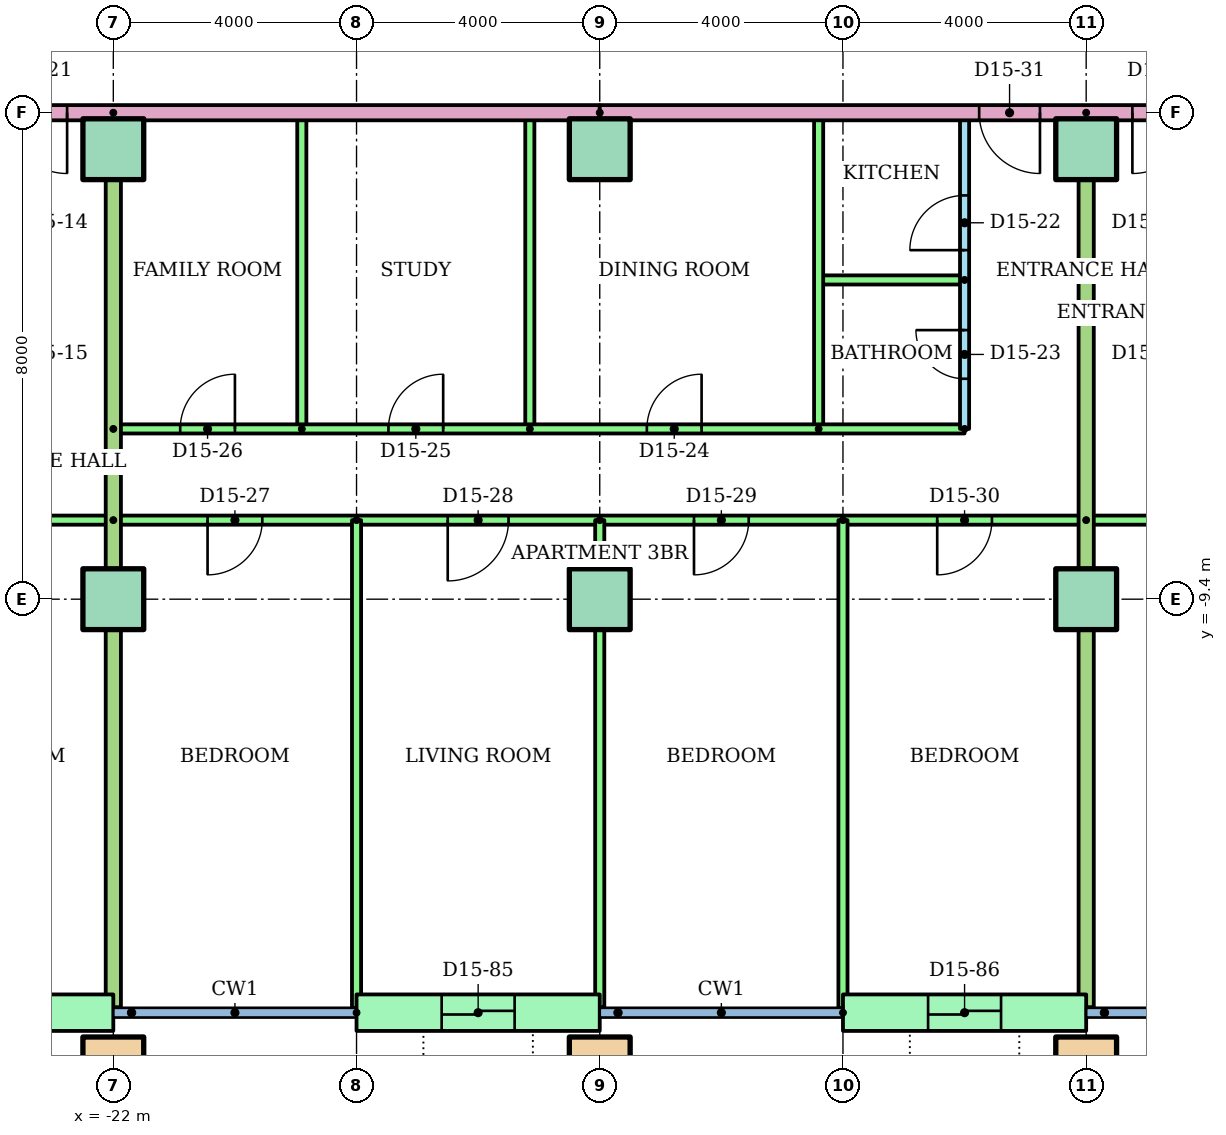
"""IFC4 building model, lengths in metres.
Left out: names, types, materials, properties, quantities, classifications, styles, units other than length and angle.
Written with IfcOpenShell. Run it as: python <this file> out.ifc"""

import sys

from ifc_helpers import new_model, si_unit, direction, frame, frame_2d, origin, origin_2d, place, context, subcontext, project, spatial, rectangle, hollow_rectangle, extrude, element, fill, save


model = new_model("IFC4")
c1 = context("Model", 3, precision=1e-05, world=origin(), true_north=direction((0.0, 1.0)))
c2 = subcontext(c1, "Body", "Model", "MODEL_VIEW")
j1 = project(units=[si_unit("LENGTHUNIT", "METRE"), si_unit("PLANEANGLEUNIT", "RADIAN")], contexts=[c1])
p1 = place(None, origin())
s1 = spatial("IfcSite", under=j1, at=p1, CompositionType="ELEMENT")
p2 = place(p1, origin())
s2 = spatial("IfcBuilding", under=s1, at=p2, CompositionType="ELEMENT")
p3 = place(p2, frame((0.0, 0.0, 57.6)))
s3 = spatial("IfcBuildingStorey", under=s2, at=p3, CompositionType="ELEMENT", Elevation=57.6)
for number, where in (
    (1, (-22.0, -17.1, 0.0)),
    (2, (-14.0, -17.1, 0.0)),
    (3, (-6.0, -17.1, 0.0)),
):
    element("IfcColumn", number, at=place(p3, frame(where)), inside=s3, PredefinedType="COLUMN", context=c2, shape_type="SweptSolid", body=[
        extrude(hollow_rectangle(XDim=1.0, YDim=1.0, WallThickness=0.05, at=origin_2d()), origin(), (0.0, 0.0, 1.0), 3.2),
    ])
for number, where in (
    (4, (-22.0, -9.4, 0.0)),
    (5, (-14.0, -9.4, 0.0)),
    (6, (-6.0, -9.4, 0.0)),
    (7, (-22.0, -2.0, 0.0)),
    (8, (-14.0, -2.0, 0.0)),
    (9, (-6.0, -2.0, 0.0)),
):
    element("IfcColumn", number, at=place(p3, frame(where)), inside=s3, PredefinedType="COLUMN", context=c2, shape_type="SweptSolid", body=[
        extrude(rectangle(XDim=1.0, YDim=1.0, at=origin_2d()), origin(), (0.0, 0.0, 1.0), 3.2),
    ])
p4 = place(p3, frame((-26.0, -16.2, 0.0)))
e10 = element("IfcWall", 10, at=p4, inside=s3, PredefinedType="STANDARD", context=c2, shape_type="SweptSolid", body=[
    extrude(rectangle(XDim=4.0, YDim=0.6, at=frame_2d((2.0, 0.0))), origin(), (0.0, 0.0, 1.0), 2.92),
])
p5 = place(p4, frame((1.4, 0.0, 0.0)))
e11 = element("IfcOpeningElement", 11, at=p5, cuts=e10, PredefinedType="OPENING", context=c2, shape_type="SweptSolid", body=[
    extrude(rectangle(XDim=1.2, YDim=2.1, at=frame_2d((0.6, 1.05))), frame((0.0, 0.31, 0.0), z_axis=(0.0, -1.0, 0.0), x_axis=(1.0, 0.0, 0.0)), (0.0, 0.0, 1.0), 0.62),
])
p6 = place(p3, frame((-18.0, -16.2, 0.0)))
e12 = element("IfcWall", 12, at=p6, inside=s3, PredefinedType="STANDARD", context=c2, shape_type="SweptSolid", body=[
    extrude(rectangle(XDim=4.0, YDim=0.6, at=frame_2d((2.0, 0.0))), origin(), (0.0, 0.0, 1.0), 2.92),
])
p7 = place(p6, frame((1.4, 0.0, 0.0)))
e13 = element("IfcOpeningElement", 13, at=p7, cuts=e12, PredefinedType="OPENING", context=c2, shape_type="SweptSolid", body=[
    extrude(rectangle(XDim=1.2, YDim=2.1, at=frame_2d((0.6, 1.05))), frame((0.0, 0.31, 0.0), z_axis=(0.0, -1.0, 0.0), x_axis=(1.0, 0.0, 0.0)), (0.0, 0.0, 1.0), 0.62),
])
p8 = place(p3, frame((-10.0, -16.2, 0.0)))
e14 = element("IfcWall", 14, at=p8, inside=s3, PredefinedType="STANDARD", context=c2, shape_type="SweptSolid", body=[
    extrude(rectangle(XDim=4.0, YDim=0.6, at=frame_2d((2.0, 0.0))), origin(), (0.0, 0.0, 1.0), 2.92),
])
p9 = place(p8, frame((1.4, 0.0, 0.0)))
e15 = element("IfcOpeningElement", 15, at=p9, cuts=e14, PredefinedType="OPENING", context=c2, shape_type="SweptSolid", body=[
    extrude(rectangle(XDim=1.2, YDim=2.1, at=frame_2d((0.6, 1.05))), frame((0.0, 0.31, 0.0), z_axis=(0.0, -1.0, 0.0), x_axis=(1.0, 0.0, 0.0)), (0.0, 0.0, 1.0), 0.62),
])
p10 = place(p3, frame((-22.0, -8.1, 0.0), z_axis=(0.0, 0.0, 1.0), x_axis=(-1.0, 0.0, 0.0)))
e16 = element("IfcWall", 16, at=p10, inside=s3, PredefinedType="PARTITIONING", context=c2, shape_type="SweptSolid", body=[
    extrude(rectangle(XDim=14.51, YDim=0.15, at=frame_2d((7.255, 0.0))), origin(), (0.0, 0.0, 1.0), 2.4),
])
p11 = place(p10, frame((11.6, 0.0, 0.0)))
e17 = element("IfcOpeningElement", 17, at=p11, cuts=e16, PredefinedType="OPENING", context=c2, shape_type="SweptSolid", body=[
    extrude(rectangle(XDim=0.9, YDim=2.1, at=frame_2d((0.45, 1.05))), frame((0.0, 0.085, 0.0), z_axis=(0.0, -1.0, 0.0), x_axis=(1.0, 0.0, 0.0)), (0.0, 0.0, 1.0), 0.17),
])
p12 = place(p10, frame((6.34, 0.0, 0.0)))
e18 = element("IfcOpeningElement", 18, at=p12, cuts=e16, PredefinedType="OPENING", context=c2, shape_type="SweptSolid", body=[
    extrude(rectangle(XDim=0.9, YDim=2.1, at=frame_2d((0.45, 1.05))), frame((0.0, 0.085, 0.0), z_axis=(0.0, -1.0, 0.0), x_axis=(1.0, 0.0, 0.0)), (0.0, 0.0, 1.0), 0.17),
])
p13 = place(p10, frame((1.5, 0.0, 0.0)))
e19 = element("IfcOpeningElement", 19, at=p13, cuts=e16, PredefinedType="OPENING", context=c2, shape_type="SweptSolid", body=[
    extrude(rectangle(XDim=1.0, YDim=2.1, at=frame_2d((0.5, 1.05))), frame((0.0, 0.085, 0.0), z_axis=(0.0, -1.0, 0.0), x_axis=(1.0, 0.0, 0.0)), (0.0, 0.0, 1.0), 0.17),
])
p14 = place(p3, frame((-8.0, -6.6, 0.0), z_axis=(0.0, 0.0, 1.0), x_axis=(0.0, 1.0, 0.0)))
e20 = element("IfcWall", 20, at=p14, inside=s3, PredefinedType="PARTITIONING", context=c2, shape_type="SweptSolid", body=[
    extrude(rectangle(XDim=5.2, YDim=0.15, at=frame_2d((2.6, 0.0))), origin(), (0.0, 0.0, 1.0), 2.4),
])
p15 = place(p14, frame((2.94, 0.0, 0.0)))
e21 = element("IfcOpeningElement", 21, at=p15, cuts=e20, PredefinedType="OPENING", context=c2, shape_type="SweptSolid", body=[
    extrude(rectangle(XDim=0.9, YDim=2.1, at=frame_2d((0.45, 1.05))), frame((0.0, 0.085, 0.0), z_axis=(0.0, -1.0, 0.0), x_axis=(1.0, 0.0, 0.0)), (0.0, 0.0, 1.0), 0.17),
])
p16 = place(p14, frame((0.825, 0.0, 0.0)))
e22 = element("IfcOpeningElement", 22, at=p16, cuts=e20, PredefinedType="OPENING", context=c2, shape_type="SweptSolid", body=[
    extrude(rectangle(XDim=0.8, YDim=2.1, at=frame_2d((0.4, 1.05))), frame((0.0, 0.085, 0.0), z_axis=(0.0, -1.0, 0.0), x_axis=(1.0, 0.0, 0.0)), (0.0, 0.0, 1.0), 0.17),
])
p17 = place(p3, frame((-8.0, -4.15, 0.0), z_axis=(0.0, 0.0, 1.0), x_axis=(-1.0, 0.0, 0.0)))
e23 = element("IfcWall", 23, at=p17, inside=s3, PredefinedType="PARTITIONING", context=c2, shape_type="SweptSolid", body=[
    extrude(rectangle(XDim=2.4, YDim=0.15, at=frame_2d((1.2, 0.0))), origin(), (0.0, 0.0, 1.0), 2.4),
])
for number, where, z_axis, x_axis in (
    (24, (-10.4, -6.6, 0.0), (0.0, 0.0, 1.0), (0.0, 1.0, 0.0)),
    (25, (-15.15, -6.6, 0.0), (0.0, 0.0, 1.0), (0.0, 1.0, 0.0)),
    (26, (-18.9, -6.6, 0.0), (0.0, 0.0, 1.0), (0.0, 1.0, 0.0)),
):
    element("IfcWall", number, at=place(p3, frame(where, z_axis=z_axis, x_axis=x_axis)), inside=s3, PredefinedType="PARTITIONING", context=c2, shape_type="SweptSolid", body=[
        extrude(rectangle(XDim=5.2, YDim=0.15, at=frame_2d((2.6, 0.0))), origin(), (0.0, 0.0, 1.0), 2.4),
    ])
p18 = place(p3, frame((-22.0, -6.6, 0.0)))
e27 = element("IfcWall", 27, at=p18, inside=s3, PredefinedType="PARTITIONING", context=c2, shape_type="SweptSolid", body=[
    extrude(rectangle(XDim=14.0, YDim=0.15, at=frame_2d((7.0, 0.0))), origin(), (0.0, 0.0, 1.0), 2.4),
])
p19 = place(p18, frame((8.775, 0.0, 0.0)))
e28 = element("IfcOpeningElement", 28, at=p19, cuts=e27, PredefinedType="OPENING", context=c2, shape_type="SweptSolid", body=[
    extrude(rectangle(XDim=0.9, YDim=2.1, at=frame_2d((0.45, 1.05))), frame((0.0, 0.085, 0.0), z_axis=(0.0, -1.0, 0.0), x_axis=(1.0, 0.0, 0.0)), (0.0, 0.0, 1.0), 0.17),
])
p20 = place(p18, frame((4.525, 0.0, 0.0)))
e29 = element("IfcOpeningElement", 29, at=p20, cuts=e27, PredefinedType="OPENING", context=c2, shape_type="SweptSolid", body=[
    extrude(rectangle(XDim=0.9, YDim=2.1, at=frame_2d((0.45, 1.05))), frame((0.0, 0.085, 0.0), z_axis=(0.0, -1.0, 0.0), x_axis=(1.0, 0.0, 0.0)), (0.0, 0.0, 1.0), 0.17),
])
p21 = place(p18, frame((1.1, 0.0, 0.0)))
e30 = element("IfcOpeningElement", 30, at=p21, cuts=e27, PredefinedType="OPENING", context=c2, shape_type="SweptSolid", body=[
    extrude(rectangle(XDim=0.9, YDim=2.1, at=frame_2d((0.45, 1.05))), frame((0.0, 0.085, 0.0), z_axis=(0.0, -1.0, 0.0), x_axis=(1.0, 0.0, 0.0)), (0.0, 0.0, 1.0), 0.17),
])
p22 = place(p3, frame((-6.0, -8.1, 0.0), z_axis=(0.0, 0.0, 1.0), x_axis=(-1.0, 0.0, 0.0)))
e31 = element("IfcWall", 31, at=p22, inside=s3, PredefinedType="PARTITIONING", context=c2, shape_type="SweptSolid", body=[
    extrude(rectangle(XDim=16.0, YDim=0.15, at=frame_2d((8.0, 0.0))), origin(), (0.0, 0.0, 1.0), 2.4),
])
p23 = place(p22, frame((13.55, 0.0, 0.0)))
e32 = element("IfcOpeningElement", 32, at=p23, cuts=e31, PredefinedType="OPENING", context=c2, shape_type="SweptSolid", body=[
    extrude(rectangle(XDim=0.9, YDim=2.1, at=frame_2d((0.45, 1.05))), frame((0.0, 0.085, 0.0), z_axis=(0.0, -1.0, 0.0), x_axis=(1.0, 0.0, 0.0)), (0.0, 0.0, 1.0), 0.17),
])
p24 = place(p22, frame((9.5, 0.0, 0.0)))
e33 = element("IfcOpeningElement", 33, at=p24, cuts=e31, PredefinedType="OPENING", context=c2, shape_type="SweptSolid", body=[
    extrude(rectangle(XDim=1.0, YDim=2.1, at=frame_2d((0.5, 1.05))), frame((0.0, 0.085, 0.0), z_axis=(0.0, -1.0, 0.0), x_axis=(1.0, 0.0, 0.0)), (0.0, 0.0, 1.0), 0.17),
])
p25 = place(p22, frame((5.55, 0.0, 0.0)))
e34 = element("IfcOpeningElement", 34, at=p25, cuts=e31, PredefinedType="OPENING", context=c2, shape_type="SweptSolid", body=[
    extrude(rectangle(XDim=0.9, YDim=2.1, at=frame_2d((0.45, 1.05))), frame((0.0, 0.085, 0.0), z_axis=(0.0, -1.0, 0.0), x_axis=(1.0, 0.0, 0.0)), (0.0, 0.0, 1.0), 0.17),
])
p26 = place(p22, frame((1.55, 0.0, 0.0)))
e35 = element("IfcOpeningElement", 35, at=p26, cuts=e31, PredefinedType="OPENING", context=c2, shape_type="SweptSolid", body=[
    extrude(rectangle(XDim=0.9, YDim=2.1, at=frame_2d((0.45, 1.05))), frame((0.0, 0.085, 0.0), z_axis=(0.0, -1.0, 0.0), x_axis=(1.0, 0.0, 0.0)), (0.0, 0.0, 1.0), 0.17),
])
p27 = place(p3, frame((-18.0, -8.1, 0.0), z_axis=(0.0, 0.0, 1.0), x_axis=(0.0, -1.0, 0.0)))
e36 = element("IfcWall", 36, at=p27, inside=s3, PredefinedType="PARTITIONING", context=c2, shape_type="SweptSolid", body=[
    extrude(rectangle(XDim=8.021, YDim=0.15, at=frame_2d((4.01, 0.0))), origin(), (0.0, 0.0, 1.0), 2.4),
])
p28 = place(p3, frame((-14.0, -8.1, 0.0), z_axis=(0.0, 0.0, 1.0), x_axis=(0.0, -1.0, 0.0)))
e37 = element("IfcWall", 37, at=p28, inside=s3, PredefinedType="PARTITIONING", context=c2, shape_type="SweptSolid", body=[
    extrude(rectangle(XDim=8.01, YDim=0.15, at=frame_2d((4.005, 0.0))), origin(), (0.0, 0.0, 1.0), 2.4),
])
p29 = place(p3, frame((-10.0, -8.1, 0.0), z_axis=(0.0, 0.0, 1.0), x_axis=(0.0, -1.0, 0.0)))
e38 = element("IfcWall", 38, at=p29, inside=s3, PredefinedType="PARTITIONING", context=c2, shape_type="SweptSolid", body=[
    extrude(rectangle(XDim=8.021, YDim=0.15, at=frame_2d((4.01, 0.0))), origin(), (0.0, 0.0, 1.0), 2.4),
])
p30 = place(p3, frame((-22.0, -1.4, 0.0), z_axis=(0.0, 0.0, 1.0), x_axis=(0.0, -1.0, 0.0)))
e39 = element("IfcWall", 39, at=p30, inside=s3, PredefinedType="PARTITIONING", context=c2, shape_type="SweptSolid", body=[
    extrude(rectangle(XDim=14.71, YDim=0.25, at=frame_2d((7.355, 0.0))), origin(), (0.0, 0.0, 1.0), 2.4),
])
p31 = place(p3, frame((10.0, -8.1, 0.0), z_axis=(0.0, 0.0, 1.0), x_axis=(-1.0, 0.0, 0.0)))
e40 = element("IfcWall", 40, at=p31, inside=s3, PredefinedType="PARTITIONING", context=c2, shape_type="SweptSolid", body=[
    extrude(rectangle(XDim=16.0, YDim=0.15, at=frame_2d((8.0, 0.0))), origin(), (0.0, 0.0, 1.0), 2.4),
])
p32 = place(p31, frame((13.55, 0.0, 0.0)))
e41 = element("IfcOpeningElement", 41, at=p32, cuts=e40, PredefinedType="OPENING", context=c2, shape_type="SweptSolid", body=[
    extrude(rectangle(XDim=0.9, YDim=2.1, at=frame_2d((0.45, 1.05))), frame((0.0, 0.085, 0.0), z_axis=(0.0, -1.0, 0.0), x_axis=(1.0, 0.0, 0.0)), (0.0, 0.0, 1.0), 0.17),
])
p33 = place(p31, frame((9.5, 0.0, 0.0)))
e42 = element("IfcOpeningElement", 42, at=p33, cuts=e40, PredefinedType="OPENING", context=c2, shape_type="SweptSolid", body=[
    extrude(rectangle(XDim=1.0, YDim=2.1, at=frame_2d((0.5, 1.05))), frame((0.0, 0.085, 0.0), z_axis=(0.0, -1.0, 0.0), x_axis=(1.0, 0.0, 0.0)), (0.0, 0.0, 1.0), 0.17),
])
p34 = place(p31, frame((5.55, 0.0, 0.0)))
e43 = element("IfcOpeningElement", 43, at=p34, cuts=e40, PredefinedType="OPENING", context=c2, shape_type="SweptSolid", body=[
    extrude(rectangle(XDim=0.9, YDim=2.1, at=frame_2d((0.45, 1.05))), frame((0.0, 0.085, 0.0), z_axis=(0.0, -1.0, 0.0), x_axis=(1.0, 0.0, 0.0)), (0.0, 0.0, 1.0), 0.17),
])
p35 = place(p31, frame((1.55, 0.0, 0.0)))
e44 = element("IfcOpeningElement", 44, at=p35, cuts=e40, PredefinedType="OPENING", context=c2, shape_type="SweptSolid", body=[
    extrude(rectangle(XDim=0.9, YDim=2.1, at=frame_2d((0.45, 1.05))), frame((0.0, 0.085, 0.0), z_axis=(0.0, -1.0, 0.0), x_axis=(1.0, 0.0, 0.0)), (0.0, 0.0, 1.0), 0.17),
])
p36 = place(p3, frame((-6.0, -1.4, 0.0), z_axis=(0.0, 0.0, 1.0), x_axis=(0.0, -1.0, 0.0)))
e45 = element("IfcWall", 45, at=p36, inside=s3, PredefinedType="PARTITIONING", context=c2, shape_type="SweptSolid", body=[
    extrude(rectangle(XDim=14.71, YDim=0.25, at=frame_2d((7.355, 0.0))), origin(), (0.0, 0.0, 1.0), 2.4),
])
p37 = place(p3, frame((-14.0, -1.4, 0.0), z_axis=(0.0, 0.0, 1.0), x_axis=(-1.0, 0.0, 0.0)))
e46 = element("IfcWall", 46, at=p37, inside=s3, PredefinedType="PARTITIONING", context=c2, shape_type="SweptSolid", body=[
    extrude(rectangle(XDim=15.0, YDim=0.25, at=frame_2d((7.5, 0.0))), origin(), (0.0, 0.0, 1.0), 2.4),
])
p38 = place(p37, frame((8.76, 0.0, 0.0)))
e47 = element("IfcOpeningElement", 47, at=p38, cuts=e46, PredefinedType="OPENING", context=c2, shape_type="SweptSolid", body=[
    extrude(rectangle(XDim=1.0, YDim=2.1, at=frame_2d((0.5, 1.05))), frame((0.0, 0.135, 0.0), z_axis=(0.0, -1.0, 0.0), x_axis=(1.0, 0.0, 0.0)), (0.0, 0.0, 1.0), 0.27),
])
p39 = place(p3, frame((14.0, -1.4, 0.0), z_axis=(0.0, 0.0, 1.0), x_axis=(-1.0, 0.0, 0.0)))
e48 = element("IfcWall", 48, at=p39, inside=s3, PredefinedType="PARTITIONING", context=c2, shape_type="SweptSolid", body=[
    extrude(rectangle(XDim=28.0, YDim=0.25, at=frame_2d((14.0, 0.0))), origin(), (0.0, 0.0, 1.0), 2.4),
])
p40 = place(p39, frame((20.76, 0.0, 0.0)))
e49 = element("IfcOpeningElement", 49, at=p40, cuts=e48, PredefinedType="OPENING", context=c2, shape_type="SweptSolid", body=[
    extrude(rectangle(XDim=1.0, YDim=2.1, at=frame_2d((0.5, 1.05))), frame((0.0, 0.135, 0.0), z_axis=(0.0, -1.0, 0.0), x_axis=(1.0, 0.0, 0.0)), (0.0, 0.0, 1.0), 0.27),
])
p41 = place(p39, frame((18.24, 0.0, 0.0)))
e50 = element("IfcOpeningElement", 50, at=p41, cuts=e48, PredefinedType="OPENING", context=c2, shape_type="SweptSolid", body=[
    extrude(rectangle(XDim=1.0, YDim=2.1, at=frame_2d((0.5, 1.05))), frame((0.0, 0.135, 0.0), z_axis=(0.0, -1.0, 0.0), x_axis=(1.0, 0.0, 0.0)), (0.0, 0.0, 1.0), 0.27),
])
p42 = place(p39, frame((2.24, 0.0, 0.0)))
e51 = element("IfcOpeningElement", 51, at=p42, cuts=e48, PredefinedType="OPENING", context=c2, shape_type="SweptSolid", body=[
    extrude(rectangle(XDim=1.0, YDim=2.1, at=frame_2d((0.5, 1.05))), frame((0.0, 0.135, 0.0), z_axis=(0.0, -1.0, 0.0), x_axis=(1.0, 0.0, 0.0)), (0.0, 0.0, 1.0), 0.27),
])
p43 = place(p38, origin())
e52 = element("IfcDoor", 52, at=p43, inside=s3, OperationType="SINGLE_SWING_LEFT", PredefinedType="DOOR", context=c2, shape_type="SweptSolid", body=[
    extrude(rectangle(XDim=1.0, YDim=2.1, at=frame_2d((0.5, 1.05))), frame((0.0, 0.025, 0.0), z_axis=(0.0, -1.0, 0.0), x_axis=(1.0, 0.0, 0.0)), (0.0, 0.0, 1.0), 0.05),
])
fill(e47, e52)
p44 = place(p15, origin())
e53 = element("IfcDoor", 53, at=p44, inside=s3, OperationType="SINGLE_SWING_LEFT", PredefinedType="DOOR", context=c2, shape_type="SweptSolid", body=[
    extrude(rectangle(XDim=0.9, YDim=2.1, at=frame_2d((0.45, 1.05))), frame((0.0, 0.025, 0.0), z_axis=(0.0, -1.0, 0.0), x_axis=(1.0, 0.0, 0.0)), (0.0, 0.0, 1.0), 0.05),
])
fill(e21, e53)
p45 = place(p16, origin())
e54 = element("IfcDoor", 54, at=p45, inside=s3, OperationType="SINGLE_SWING_RIGHT", PredefinedType="DOOR", context=c2, shape_type="SweptSolid", body=[
    extrude(rectangle(XDim=0.8, YDim=2.1, at=frame_2d((0.4, 1.05))), frame((0.0, 0.025, 0.0), z_axis=(0.0, -1.0, 0.0), x_axis=(1.0, 0.0, 0.0)), (0.0, 0.0, 1.0), 0.05),
])
fill(e22, e54)
p46 = place(p19, origin())
e55 = element("IfcDoor", 55, at=p46, inside=s3, OperationType="SINGLE_SWING_RIGHT", PredefinedType="DOOR", context=c2, shape_type="SweptSolid", body=[
    extrude(rectangle(XDim=0.9, YDim=2.1, at=frame_2d((0.45, 1.05))), frame((0.0, 0.025, 0.0), z_axis=(0.0, -1.0, 0.0), x_axis=(1.0, 0.0, 0.0)), (0.0, 0.0, 1.0), 0.05),
])
fill(e28, e55)
p47 = place(p20, origin())
e56 = element("IfcDoor", 56, at=p47, inside=s3, OperationType="SINGLE_SWING_RIGHT", PredefinedType="DOOR", context=c2, shape_type="SweptSolid", body=[
    extrude(rectangle(XDim=0.9, YDim=2.1, at=frame_2d((0.45, 1.05))), frame((0.0, 0.025, 0.0), z_axis=(0.0, -1.0, 0.0), x_axis=(1.0, 0.0, 0.0)), (0.0, 0.0, 1.0), 0.05),
])
fill(e29, e56)
p48 = place(p21, origin())
e57 = element("IfcDoor", 57, at=p48, inside=s3, OperationType="SINGLE_SWING_RIGHT", PredefinedType="DOOR", context=c2, shape_type="SweptSolid", body=[
    extrude(rectangle(XDim=0.9, YDim=2.1, at=frame_2d((0.45, 1.05))), frame((0.0, 0.025, 0.0), z_axis=(0.0, -1.0, 0.0), x_axis=(1.0, 0.0, 0.0)), (0.0, 0.0, 1.0), 0.05),
])
fill(e30, e57)
p49 = place(p23, origin())
e58 = element("IfcDoor", 58, at=p49, inside=s3, OperationType="SINGLE_SWING_RIGHT", PredefinedType="DOOR", context=c2, shape_type="SweptSolid", body=[
    extrude(rectangle(XDim=0.9, YDim=2.1, at=frame_2d((0.45, 1.05))), frame((0.0, 0.025, 0.0), z_axis=(0.0, -1.0, 0.0), x_axis=(1.0, 0.0, 0.0)), (0.0, 0.0, 1.0), 0.05),
])
fill(e32, e58)
p50 = place(p24, origin())
e59 = element("IfcDoor", 59, at=p50, inside=s3, OperationType="SINGLE_SWING_RIGHT", PredefinedType="DOOR", context=c2, shape_type="SweptSolid", body=[
    extrude(rectangle(XDim=1.0, YDim=2.1, at=frame_2d((0.5, 1.05))), frame((0.0, 0.025, 0.0), z_axis=(0.0, -1.0, 0.0), x_axis=(1.0, 0.0, 0.0)), (0.0, 0.0, 1.0), 0.05),
])
fill(e33, e59)
p51 = place(p25, origin())
e60 = element("IfcDoor", 60, at=p51, inside=s3, OperationType="SINGLE_SWING_RIGHT", PredefinedType="DOOR", context=c2, shape_type="SweptSolid", body=[
    extrude(rectangle(XDim=0.9, YDim=2.1, at=frame_2d((0.45, 1.05))), frame((0.0, 0.025, 0.0), z_axis=(0.0, -1.0, 0.0), x_axis=(1.0, 0.0, 0.0)), (0.0, 0.0, 1.0), 0.05),
])
fill(e34, e60)
p52 = place(p26, origin())
e61 = element("IfcDoor", 61, at=p52, inside=s3, OperationType="SINGLE_SWING_RIGHT", PredefinedType="DOOR", context=c2, shape_type="SweptSolid", body=[
    extrude(rectangle(XDim=0.9, YDim=2.1, at=frame_2d((0.45, 1.05))), frame((0.0, 0.025, 0.0), z_axis=(0.0, -1.0, 0.0), x_axis=(1.0, 0.0, 0.0)), (0.0, 0.0, 1.0), 0.05),
])
fill(e35, e61)
p53 = place(p40, origin())
e62 = element("IfcDoor", 62, at=p53, inside=s3, OperationType="SINGLE_SWING_LEFT", PredefinedType="DOOR", context=c2, shape_type="SweptSolid", body=[
    extrude(rectangle(XDim=1.0, YDim=2.1, at=frame_2d((0.5, 1.05))), frame((0.0, 0.025, 0.0), z_axis=(0.0, -1.0, 0.0), x_axis=(1.0, 0.0, 0.0)), (0.0, 0.0, 1.0), 0.05),
])
fill(e49, e62)
p54 = place(p41, origin())
e63 = element("IfcDoor", 63, at=p54, inside=s3, OperationType="SINGLE_SWING_RIGHT", PredefinedType="DOOR", context=c2, shape_type="SweptSolid", body=[
    extrude(rectangle(XDim=1.0, YDim=2.1, at=frame_2d((0.5, 1.05))), frame((0.0, 0.025, 0.0), z_axis=(0.0, -1.0, 0.0), x_axis=(1.0, 0.0, 0.0)), (0.0, 0.0, 1.0), 0.05),
])
fill(e50, e63)
p55 = place(p7, origin())
e64 = element("IfcDoor", 64, at=p55, inside=s3, OperationType="SLIDING_TO_LEFT", PredefinedType="DOOR", context=c2, shape_type="SweptSolid", body=[
    extrude(rectangle(XDim=1.2, YDim=2.1, at=frame_2d((0.6, 1.05))), frame((0.0, 0.025, 0.0), z_axis=(0.0, -1.0, 0.0), x_axis=(1.0, 0.0, 0.0)), (0.0, 0.0, 1.0), 0.05),
])
fill(e13, e64)
p56 = place(p9, origin())
e65 = element("IfcDoor", 65, at=p56, inside=s3, OperationType="SLIDING_TO_LEFT", PredefinedType="DOOR", context=c2, shape_type="SweptSolid", body=[
    extrude(rectangle(XDim=1.2, YDim=2.1, at=frame_2d((0.6, 1.05))), frame((0.0, 0.025, 0.0), z_axis=(0.0, -1.0, 0.0), x_axis=(1.0, 0.0, 0.0)), (0.0, 0.0, 1.0), 0.05),
])
fill(e15, e65)
save(model, sys.argv[1])
